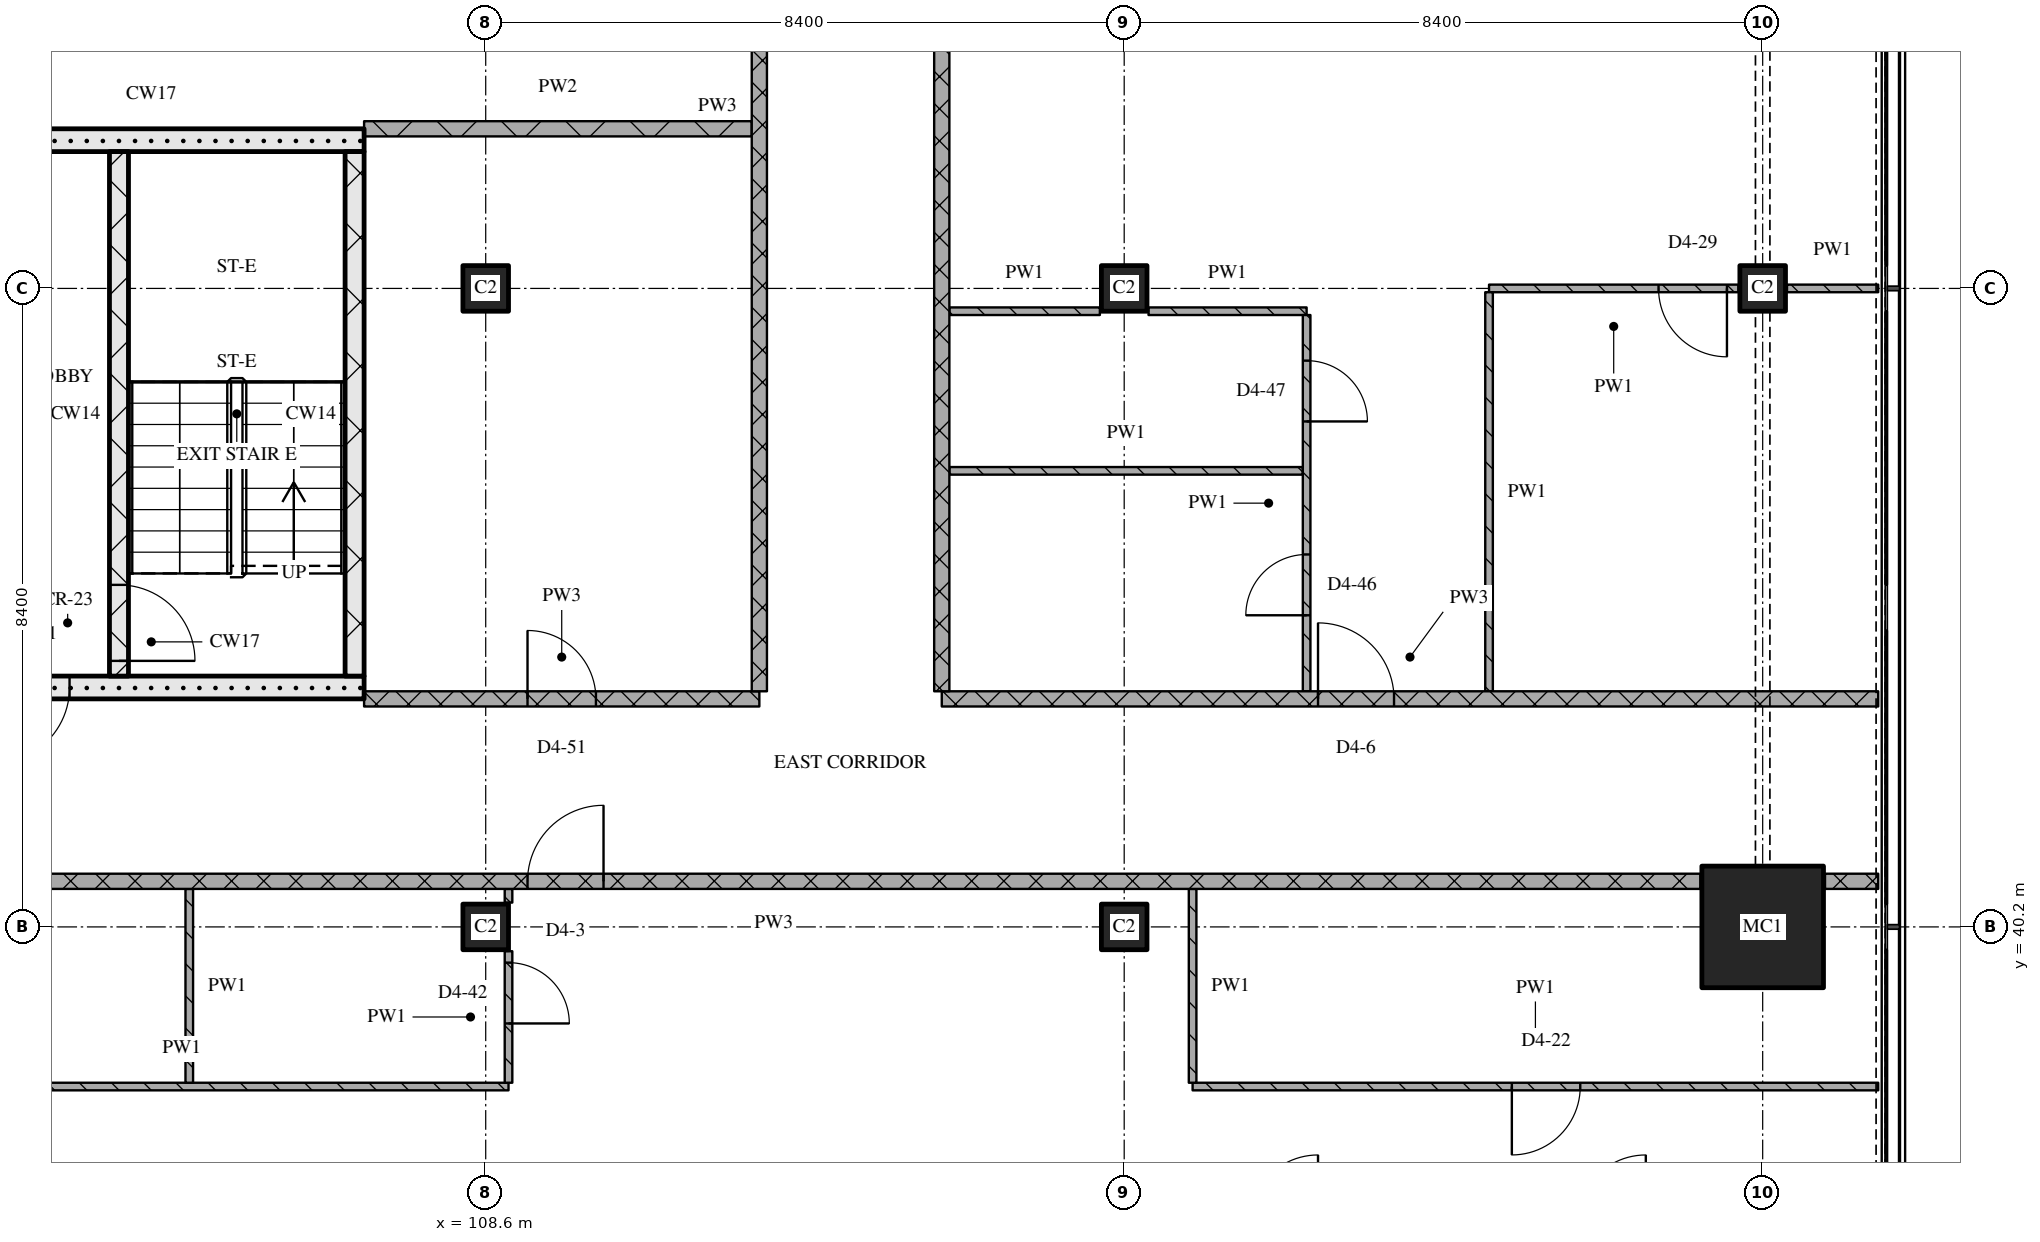
"""IFC4 building model, lengths in metres.
Left out: names, types, materials, properties, quantities, classifications, styles, units other than length and angle.
Written with IfcOpenShell. Run it as: python <this file> out.ifc"""

import sys

from ifc_helpers import new_model, si_unit, direction, frame, frame_2d, origin, origin_2d, place, context, subcontext, project, spatial, rectangle, extrude, element, fill, save


model = new_model("IFC4")
c1 = context("Model", 3, precision=1e-05, world=origin(), true_north=direction((0.0, 1.0)))
c2 = subcontext(c1, "Body", "Model", "MODEL_VIEW")
j1 = project(units=[si_unit("LENGTHUNIT", "METRE"), si_unit("PLANEANGLEUNIT", "RADIAN")], contexts=[c1])
p1 = place(None, origin())
s1 = spatial("IfcSite", under=j1, at=p1, CompositionType="ELEMENT")
p2 = place(p1, origin())
s2 = spatial("IfcBuilding", under=s1, at=p2, CompositionType="ELEMENT")
p3 = place(p2, frame((0.0, 0.0, 237.9)))
s3 = spatial("IfcBuildingStorey", under=s2, at=p3, CompositionType="ELEMENT", Elevation=237.9)
for number, where, z_axis, x_axis in (
    (1, (108.6, 40.2, 0.0), (0.0, 0.0, 1.0), (1.0, 0.0, 0.0)),
    (2, (108.6, 48.6, 0.0), (0.0, 0.0, 1.0), (1.0, 0.0, 0.0)),
    (3, (117.0, 40.2, 0.0), (0.0, 0.0, 1.0), (1.0, 0.0, 0.0)),
    (4, (117.0, 48.6, 0.0), (0.0, 0.0, 1.0), (1.0, 0.0, 0.0)),
):
    element("IfcColumn", number, at=place(p3, frame(where, z_axis=z_axis, x_axis=x_axis)), inside=s3, PredefinedType="COLUMN", context=c2, shape_type="SweptSolid", body=[
        extrude(rectangle(XDim=0.6, YDim=0.6, at=origin_2d()), origin(), (0.0, 0.0, 1.0), 3.6),
    ])
p4 = place(p3, frame((125.4, 40.2, 0.0), z_axis=(0.0, 0.0, 1.0), x_axis=(1.0, 0.0, 0.0)))
e5 = element("IfcColumn", 5, at=p4, inside=s3, PredefinedType="COLUMN", context=c2, shape_type="SweptSolid", body=[
    extrude(rectangle(XDim=1.6, YDim=1.6, at=origin_2d()), origin(), (0.0, 0.0, 1.0), 3.6),
])
p5 = place(p3, frame((125.4, 48.6, 0.0), z_axis=(0.0, 0.0, 1.0), x_axis=(1.0, 0.0, 0.0)))
e6 = element("IfcColumn", 6, at=p5, inside=s3, PredefinedType="COLUMN", context=c2, shape_type="SweptSolid", body=[
    extrude(rectangle(XDim=0.6, YDim=0.6, at=origin_2d()), origin(), (0.0, 0.0, 1.0), 3.6),
])
p6 = place(p3, frame((101.4, 43.35, 0.0), z_axis=(0.0, 0.0, 1.0), x_axis=(1.0, 0.0, 0.0)))
e7 = element("IfcWall", 7, at=p6, inside=s3, PredefinedType="SOLIDWALL", context=c2, shape_type="SweptSolid", body=[
    extrude(rectangle(XDim=5.6, YDim=0.3, at=frame_2d((2.8, 0.0))), origin(), (0.0, 0.0, 1.0), 3.32),
])
p7 = place(p6, frame((0.725, 0.0, 0.0)))
e8 = element("IfcOpeningElement", 8, at=p7, cuts=e7, PredefinedType="OPENING", context=c2, shape_type="SweptSolid", body=[
    extrude(rectangle(XDim=1.0, YDim=2.1, at=frame_2d((0.5, 1.05))), frame((0.0, 0.16, 0.0), z_axis=(0.0, -1.0, 0.0), x_axis=(1.0, 0.0, 0.0)), (0.0, 0.0, 1.0), 0.32),
])
p8 = place(p3, frame((103.775, 43.5, 0.0), z_axis=(0.0, 0.0, 1.0), x_axis=(0.0, 1.0, 0.0)))
e9 = element("IfcWall", 9, at=p8, inside=s3, PredefinedType="SOLIDWALL", context=c2, shape_type="SweptSolid", body=[
    extrude(rectangle(XDim=6.9, YDim=0.25, at=frame_2d((3.45, 0.0))), origin(), (0.0, 0.0, 1.0), 3.32),
])
p9 = place(p8, frame((0.2, 0.0, 0.0)))
e10 = element("IfcOpeningElement", 10, at=p9, cuts=e9, PredefinedType="OPENING", context=c2, shape_type="SweptSolid", body=[
    extrude(rectangle(XDim=1.0, YDim=2.1, at=frame_2d((0.5, 1.05))), frame((0.0, 0.135, 0.0), z_axis=(0.0, -1.0, 0.0), x_axis=(1.0, 0.0, 0.0)), (0.0, 0.0, 1.0), 0.27),
])
p10 = place(p3, frame((106.875, 43.5, 0.0), z_axis=(0.0, 0.0, 1.0), x_axis=(0.0, 1.0, 0.0)))
e11 = element("IfcWall", 11, at=p10, inside=s3, PredefinedType="SOLIDWALL", context=c2, shape_type="SweptSolid", body=[
    extrude(rectangle(XDim=6.9, YDim=0.25, at=frame_2d((3.45, 0.0))), origin(), (0.0, 0.0, 1.0), 3.32),
])
p11 = place(p3, frame((101.4, 50.55, 0.0), z_axis=(0.0, 0.0, 1.0), x_axis=(1.0, 0.0, 0.0)))
e12 = element("IfcWall", 12, at=p11, inside=s3, PredefinedType="SOLIDWALL", context=c2, shape_type="SweptSolid", body=[
    extrude(rectangle(XDim=5.6, YDim=0.3, at=frame_2d((2.8, 0.0))), origin(), (0.0, 0.0, 1.0), 3.32),
])
p12 = place(p3, frame((100.3, 38.1, 0.0), z_axis=(0.0, 0.0, 1.0), x_axis=(1.0, 0.0, 0.0)))
e13 = element("IfcWall", 13, at=p12, inside=s3, PredefinedType="PARTITIONING", context=c2, shape_type="SweptSolid", body=[
    extrude(rectangle(XDim=8.6, YDim=0.1, at=frame_2d((4.3, 0.0))), origin(), (0.0, 0.0, 1.0), 3.32),
])
p13 = place(p12, frame((1.75, 0.0, 0.0)))
e14 = element("IfcOpeningElement", 14, at=p13, cuts=e13, PredefinedType="OPENING", context=c2, shape_type="SweptSolid", body=[
    extrude(rectangle(XDim=0.8, YDim=2.1, at=frame_2d((0.4, 1.05))), frame((0.0, 0.06, 0.0), z_axis=(0.0, -1.0, 0.0), x_axis=(1.0, 0.0, 0.0)), (0.0, 0.0, 1.0), 0.12),
])
p14 = place(p3, frame((117.9, 38.1, 0.0), z_axis=(0.0, 0.0, 1.0), x_axis=(1.0, 0.0, 0.0)))
e15 = element("IfcWall", 15, at=p14, inside=s3, PredefinedType="PARTITIONING", context=c2, shape_type="SweptSolid", body=[
    extrude(rectangle(XDim=9.02, YDim=0.1, at=frame_2d((4.51, 0.0))), origin(), (0.0, 0.0, 1.0), 3.32),
])
p15 = place(p14, frame((4.2, 0.0, 0.0)))
e16 = element("IfcOpeningElement", 16, at=p15, cuts=e15, PredefinedType="OPENING", context=c2, shape_type="SweptSolid", body=[
    extrude(rectangle(XDim=0.9, YDim=2.1, at=frame_2d((0.45, 1.05))), frame((0.0, 0.06, 0.0), z_axis=(0.0, -1.0, 0.0), x_axis=(1.0, 0.0, 0.0)), (0.0, 0.0, 1.0), 0.12),
])
p16 = place(p3, frame((124.58, 40.8, 0.0), z_axis=(0.0, 0.0, 1.0), x_axis=(-1.0, 0.0, 0.0)))
e17 = element("IfcWall", 17, at=p16, inside=s3, PredefinedType="PARTITIONING", context=c2, shape_type="SweptSolid", body=[
    extrude(rectangle(XDim=24.38, YDim=0.2, at=frame_2d((12.19, 0.0))), origin(), (0.0, 0.0, 1.0), 3.32),
])
p17 = place(p16, frame((14.43, 0.0, 0.0)))
e18 = element("IfcOpeningElement", 18, at=p17, cuts=e17, PredefinedType="OPENING", context=c2, shape_type="SweptSolid", body=[
    extrude(rectangle(XDim=1.0, YDim=2.1, at=frame_2d((0.5, 1.05))), frame((0.0, 0.11, 0.0), z_axis=(0.0, -1.0, 0.0), x_axis=(1.0, 0.0, 0.0)), (0.0, 0.0, 1.0), 0.22),
])
p18 = place(p3, frame((126.22, 40.8, 0.0), z_axis=(0.0, 0.0, 1.0), x_axis=(1.0, 0.0, 0.0)))
e19 = element("IfcWall", 19, at=p18, inside=s3, PredefinedType="PARTITIONING", context=c2, shape_type="SweptSolid", body=[
    extrude(rectangle(XDim=0.7, YDim=0.2, at=frame_2d((0.35, 0.0))), origin(), (0.0, 0.0, 1.0), 3.32),
])
p19 = place(p3, frame((107.0, 43.2, 0.0), z_axis=(0.0, 0.0, 1.0), x_axis=(1.0, 0.0, 0.0)))
e20 = element("IfcWall", 20, at=p19, inside=s3, PredefinedType="PARTITIONING", context=c2, shape_type="SweptSolid", body=[
    extrude(rectangle(XDim=5.2, YDim=0.2, at=frame_2d((2.6, 0.0))), origin(), (0.0, 0.0, 1.0), 3.32),
])
p20 = place(p19, frame((2.15, 0.0, 0.0)))
e21 = element("IfcOpeningElement", 21, at=p20, cuts=e20, PredefinedType="OPENING", context=c2, shape_type="SweptSolid", body=[
    extrude(rectangle(XDim=0.9, YDim=2.1, at=frame_2d((0.45, 1.05))), frame((0.0, 0.11, 0.0), z_axis=(0.0, -1.0, 0.0), x_axis=(1.0, 0.0, 0.0)), (0.0, 0.0, 1.0), 0.22),
])
p21 = place(p3, frame((114.6, 43.2, 0.0), z_axis=(0.0, 0.0, 1.0), x_axis=(1.0, 0.0, 0.0)))
e22 = element("IfcWall", 22, at=p21, inside=s3, PredefinedType="PARTITIONING", context=c2, shape_type="SweptSolid", body=[
    extrude(rectangle(XDim=12.32, YDim=0.2, at=frame_2d((6.16, 0.0))), origin(), (0.0, 0.0, 1.0), 3.32),
])
p22 = place(p21, frame((4.95, 0.0, 0.0)))
e23 = element("IfcOpeningElement", 23, at=p22, cuts=e22, PredefinedType="OPENING", context=c2, shape_type="SweptSolid", body=[
    extrude(rectangle(XDim=1.0, YDim=2.1, at=frame_2d((0.5, 1.05))), frame((0.0, 0.11, 0.0), z_axis=(0.0, -1.0, 0.0), x_axis=(1.0, 0.0, 0.0)), (0.0, 0.0, 1.0), 0.22),
])
p23 = place(p3, frame((114.7, 46.2, 0.0), z_axis=(0.0, 0.0, 1.0), x_axis=(1.0, 0.0, 0.0)))
e24 = element("IfcWall", 24, at=p23, inside=s3, PredefinedType="PARTITIONING", context=c2, shape_type="SweptSolid", body=[
    extrude(rectangle(XDim=4.65, YDim=0.1, at=frame_2d((2.325, 0.0))), origin(), (0.0, 0.0, 1.0), 3.32),
])
p24 = place(p3, frame((114.7, 48.3, 0.0), z_axis=(0.0, 0.0, 1.0), x_axis=(1.0, 0.0, 0.0)))
e25 = element("IfcWall", 25, at=p24, inside=s3, PredefinedType="PARTITIONING", context=c2, shape_type="SweptSolid", body=[
    extrude(rectangle(XDim=1.98, YDim=0.1, at=frame_2d((0.99, 0.0))), origin(), (0.0, 0.0, 1.0), 3.32),
])
p25 = place(p3, frame((117.32, 48.3, 0.0), z_axis=(0.0, 0.0, 1.0), x_axis=(1.0, 0.0, 0.0)))
e26 = element("IfcWall", 26, at=p25, inside=s3, PredefinedType="PARTITIONING", context=c2, shape_type="SweptSolid", body=[
    extrude(rectangle(XDim=2.08, YDim=0.1, at=frame_2d((1.04, 0.0))), origin(), (0.0, 0.0, 1.0), 3.32),
])
p26 = place(p3, frame((125.08, 48.6, 0.0), z_axis=(0.0, 0.0, 1.0), x_axis=(-1.0, 0.0, 0.0)))
e27 = element("IfcWall", 27, at=p26, inside=s3, PredefinedType="PARTITIONING", context=c2, shape_type="SweptSolid", body=[
    extrude(rectangle(XDim=3.28, YDim=0.1, at=frame_2d((1.64, 0.0))), origin(), (0.0, 0.0, 1.0), 3.32),
])
p27 = place(p26, frame((0.15, 0.0, 0.0)))
e28 = element("IfcOpeningElement", 28, at=p27, cuts=e27, PredefinedType="OPENING", context=c2, shape_type="SweptSolid", body=[
    extrude(rectangle(XDim=0.9, YDim=2.1, at=frame_2d((0.45, 1.05))), frame((0.0, 0.06, 0.0), z_axis=(0.0, -1.0, 0.0), x_axis=(1.0, 0.0, 0.0)), (0.0, 0.0, 1.0), 0.12),
])
p28 = place(p3, frame((125.72, 48.6, 0.0), z_axis=(0.0, 0.0, 1.0), x_axis=(1.0, 0.0, 0.0)))
e29 = element("IfcWall", 29, at=p28, inside=s3, PredefinedType="PARTITIONING", context=c2, shape_type="SweptSolid", body=[
    extrude(rectangle(XDim=1.2, YDim=0.1, at=frame_2d((0.6, 0.0))), origin(), (0.0, 0.0, 1.0), 3.32),
])
p29 = place(p3, frame((107.0, 50.7, 0.0), z_axis=(0.0, 0.0, 1.0), x_axis=(1.0, 0.0, 0.0)))
e30 = element("IfcWall", 30, at=p29, inside=s3, PredefinedType="PARTITIONING", context=c2, shape_type="SweptSolid", body=[
    extrude(rectangle(XDim=5.1, YDim=0.2, at=frame_2d((2.55, 0.0))), origin(), (0.0, 0.0, 1.0), 3.32),
])
p30 = place(p3, frame((104.7, 40.7, 0.0), z_axis=(0.0, 0.0, 1.0), x_axis=(0.0, -1.0, 0.0)))
e31 = element("IfcWall", 31, at=p30, inside=s3, PredefinedType="PARTITIONING", context=c2, shape_type="SweptSolid", body=[
    extrude(rectangle(XDim=2.55, YDim=0.1, at=frame_2d((1.275, 0.0))), origin(), (0.0, 0.0, 1.0), 3.32),
])
p31 = place(p3, frame((108.9, 38.15, 0.0), z_axis=(0.0, 0.0, 1.0), x_axis=(0.0, 1.0, 0.0)))
e32 = element("IfcWall", 32, at=p31, inside=s3, PredefinedType="PARTITIONING", context=c2, shape_type="SweptSolid", body=[
    extrude(rectangle(XDim=1.73, YDim=0.1, at=frame_2d((0.865, 0.0))), origin(), (0.0, 0.0, 1.0), 3.32),
])
p32 = place(p31, frame((0.78, 0.0, 0.0)))
e33 = element("IfcOpeningElement", 33, at=p32, cuts=e32, PredefinedType="OPENING", context=c2, shape_type="SweptSolid", body=[
    extrude(rectangle(XDim=0.8, YDim=2.1, at=frame_2d((0.4, 1.05))), frame((0.0, 0.06, 0.0), z_axis=(0.0, -1.0, 0.0), x_axis=(1.0, 0.0, 0.0)), (0.0, 0.0, 1.0), 0.12),
])
p33 = place(p3, frame((108.9, 40.7, 0.0), z_axis=(0.0, 0.0, 1.0), x_axis=(0.0, -1.0, 0.0)))
e34 = element("IfcWall", 34, at=p33, inside=s3, PredefinedType="PARTITIONING", context=c2, shape_type="SweptSolid", body=[
    extrude(rectangle(XDim=0.18, YDim=0.1, at=frame_2d((0.09, 0.0))), origin(), (0.0, 0.0, 1.0), 3.32),
])
p34 = place(p3, frame((112.2, 43.3, 0.0), z_axis=(0.0, 0.0, 1.0), x_axis=(0.0, 1.0, 0.0)))
e35 = element("IfcWall", 35, at=p34, inside=s3, PredefinedType="PARTITIONING", context=c2, shape_type="SweptSolid", body=[
    extrude(rectangle(XDim=15.4, YDim=0.2, at=frame_2d((7.7, 0.0))), origin(), (0.0, 0.0, 1.0), 3.32),
])
p35 = place(p34, frame((10.95, 0.0, 0.0)))
e36 = element("IfcOpeningElement", 36, at=p35, cuts=e35, PredefinedType="OPENING", context=c2, shape_type="SweptSolid", body=[
    extrude(rectangle(XDim=1.0, YDim=2.1, at=frame_2d((0.5, 1.05))), frame((0.0, 0.11, 0.0), z_axis=(0.0, -1.0, 0.0), x_axis=(1.0, 0.0, 0.0)), (0.0, 0.0, 1.0), 0.22),
])
p36 = place(p3, frame((114.6, 61.1, 0.0), z_axis=(0.0, 0.0, 1.0), x_axis=(0.0, -1.0, 0.0)))
e37 = element("IfcWall", 37, at=p36, inside=s3, PredefinedType="PARTITIONING", context=c2, shape_type="SweptSolid", body=[
    extrude(rectangle(XDim=17.8, YDim=0.2, at=frame_2d((8.9, 0.0))), origin(), (0.0, 0.0, 1.0), 3.32),
])
p37 = place(p3, frame((117.9, 40.7, 0.0), z_axis=(0.0, 0.0, 1.0), x_axis=(0.0, -1.0, 0.0)))
e38 = element("IfcWall", 38, at=p37, inside=s3, PredefinedType="PARTITIONING", context=c2, shape_type="SweptSolid", body=[
    extrude(rectangle(XDim=2.55, YDim=0.1, at=frame_2d((1.275, 0.0))), origin(), (0.0, 0.0, 1.0), 3.32),
])
p38 = place(p3, frame((119.4, 43.3, 0.0), z_axis=(0.0, 0.0, 1.0), x_axis=(0.0, 1.0, 0.0)))
e39 = element("IfcWall", 39, at=p38, inside=s3, PredefinedType="PARTITIONING", context=c2, shape_type="SweptSolid", body=[
    extrude(rectangle(XDim=4.95, YDim=0.1, at=frame_2d((2.475, 0.0))), origin(), (0.0, 0.0, 1.0), 3.32),
])
p39 = place(p38, frame((1.0, 0.0, 0.0)))
e40 = element("IfcOpeningElement", 40, at=p39, cuts=e39, PredefinedType="OPENING", context=c2, shape_type="SweptSolid", body=[
    extrude(rectangle(XDim=0.8, YDim=2.1, at=frame_2d((0.4, 1.05))), frame((0.0, 0.06, 0.0), z_axis=(0.0, -1.0, 0.0), x_axis=(1.0, 0.0, 0.0)), (0.0, 0.0, 1.0), 0.12),
])
p40 = place(p38, frame((3.55, 0.0, 0.0)))
e41 = element("IfcOpeningElement", 41, at=p40, cuts=e39, PredefinedType="OPENING", context=c2, shape_type="SweptSolid", body=[
    extrude(rectangle(XDim=0.8, YDim=2.1, at=frame_2d((0.4, 1.05))), frame((0.0, 0.06, 0.0), z_axis=(0.0, -1.0, 0.0), x_axis=(1.0, 0.0, 0.0)), (0.0, 0.0, 1.0), 0.12),
])
p41 = place(p3, frame((121.8, 48.55, 0.0), z_axis=(0.0, 0.0, 1.0), x_axis=(0.0, -1.0, 0.0)))
e42 = element("IfcWall", 42, at=p41, inside=s3, PredefinedType="PARTITIONING", context=c2, shape_type="SweptSolid", body=[
    extrude(rectangle(XDim=5.25, YDim=0.1, at=frame_2d((2.625, 0.0))), origin(), (0.0, 0.0, 1.0), 3.32),
])
p42 = place(p7, origin())
e43 = element("IfcDoor", 43, at=p42, inside=s3, OperationType="SINGLE_SWING_RIGHT", PredefinedType="DOOR", context=c2, shape_type="SweptSolid", body=[
    extrude(rectangle(XDim=1.0, YDim=2.1, at=frame_2d((0.5, 1.05))), frame((0.0, 0.025, 0.0), z_axis=(0.0, -1.0, 0.0), x_axis=(1.0, 0.0, 0.0)), (0.0, 0.0, 1.0), 0.05),
])
fill(e8, e43)
p43 = place(p9, origin())
e44 = element("IfcDoor", 44, at=p43, inside=s3, OperationType="SINGLE_SWING_RIGHT", PredefinedType="DOOR", context=c2, shape_type="SweptSolid", body=[
    extrude(rectangle(XDim=1.0, YDim=2.1, at=frame_2d((0.5, 1.05))), frame((0.0, 0.025, 0.0), z_axis=(0.0, -1.0, 0.0), x_axis=(1.0, 0.0, 0.0)), (0.0, 0.0, 1.0), 0.05),
])
fill(e10, e44)
p44 = place(p15, origin())
e45 = element("IfcDoor", 45, at=p44, inside=s3, OperationType="SINGLE_SWING_RIGHT", PredefinedType="DOOR", context=c2, shape_type="SweptSolid", body=[
    extrude(rectangle(XDim=0.9, YDim=2.1, at=frame_2d((0.45, 1.05))), frame((0.0, 0.025, 0.0), z_axis=(0.0, -1.0, 0.0), x_axis=(1.0, 0.0, 0.0)), (0.0, 0.0, 1.0), 0.05),
])
fill(e16, e45)
p45 = place(p17, origin())
e46 = element("IfcDoor", 46, at=p45, inside=s3, OperationType="SINGLE_SWING_RIGHT", PredefinedType="DOOR", context=c2, shape_type="SweptSolid", body=[
    extrude(rectangle(XDim=1.0, YDim=2.1, at=frame_2d((0.5, 1.05))), frame((0.0, 0.025, 0.0), z_axis=(0.0, -1.0, 0.0), x_axis=(1.0, 0.0, 0.0)), (0.0, 0.0, 1.0), 0.05),
])
fill(e18, e46)
p46 = place(p20, origin())
e47 = element("IfcDoor", 47, at=p46, inside=s3, OperationType="SINGLE_SWING_LEFT", PredefinedType="DOOR", context=c2, shape_type="SweptSolid", body=[
    extrude(rectangle(XDim=0.9, YDim=2.1, at=frame_2d((0.45, 1.05))), frame((0.0, 0.025, 0.0), z_axis=(0.0, -1.0, 0.0), x_axis=(1.0, 0.0, 0.0)), (0.0, 0.0, 1.0), 0.05),
])
fill(e21, e47)
p47 = place(p22, origin())
e48 = element("IfcDoor", 48, at=p47, inside=s3, OperationType="SINGLE_SWING_LEFT", PredefinedType="DOOR", context=c2, shape_type="SweptSolid", body=[
    extrude(rectangle(XDim=1.0, YDim=2.1, at=frame_2d((0.5, 1.05))), frame((0.0, 0.025, 0.0), z_axis=(0.0, -1.0, 0.0), x_axis=(1.0, 0.0, 0.0)), (0.0, 0.0, 1.0), 0.05),
])
fill(e23, e48)
p48 = place(p27, origin())
e49 = element("IfcDoor", 49, at=p48, inside=s3, OperationType="SINGLE_SWING_LEFT", PredefinedType="DOOR", context=c2, shape_type="SweptSolid", body=[
    extrude(rectangle(XDim=0.9, YDim=2.1, at=frame_2d((0.45, 1.05))), frame((0.0, 0.025, 0.0), z_axis=(0.0, -1.0, 0.0), x_axis=(1.0, 0.0, 0.0)), (0.0, 0.0, 1.0), 0.05),
])
fill(e28, e49)
p49 = place(p32, origin())
e50 = element("IfcDoor", 50, at=p49, inside=s3, OperationType="SINGLE_SWING_RIGHT", PredefinedType="DOOR", context=c2, shape_type="SweptSolid", body=[
    extrude(rectangle(XDim=0.8, YDim=2.1, at=frame_2d((0.4, 1.05))), frame((0.0, 0.025, 0.0), z_axis=(0.0, -1.0, 0.0), x_axis=(1.0, 0.0, 0.0)), (0.0, 0.0, 1.0), 0.05),
])
fill(e33, e50)
p50 = place(p39, origin())
e51 = element("IfcDoor", 51, at=p50, inside=s3, OperationType="SINGLE_SWING_LEFT", PredefinedType="DOOR", context=c2, shape_type="SweptSolid", body=[
    extrude(rectangle(XDim=0.8, YDim=2.1, at=frame_2d((0.4, 1.05))), frame((0.0, 0.025, 0.0), z_axis=(0.0, -1.0, 0.0), x_axis=(1.0, 0.0, 0.0)), (0.0, 0.0, 1.0), 0.05),
])
fill(e40, e51)
p51 = place(p40, origin())
e52 = element("IfcDoor", 52, at=p51, inside=s3, OperationType="SINGLE_SWING_RIGHT", PredefinedType="DOOR", context=c2, shape_type="SweptSolid", body=[
    extrude(rectangle(XDim=0.8, YDim=2.1, at=frame_2d((0.4, 1.05))), frame((0.0, 0.025, 0.0), z_axis=(0.0, -1.0, 0.0), x_axis=(1.0, 0.0, 0.0)), (0.0, 0.0, 1.0), 0.05),
])
fill(e41, e52)
save(model, sys.argv[1])
